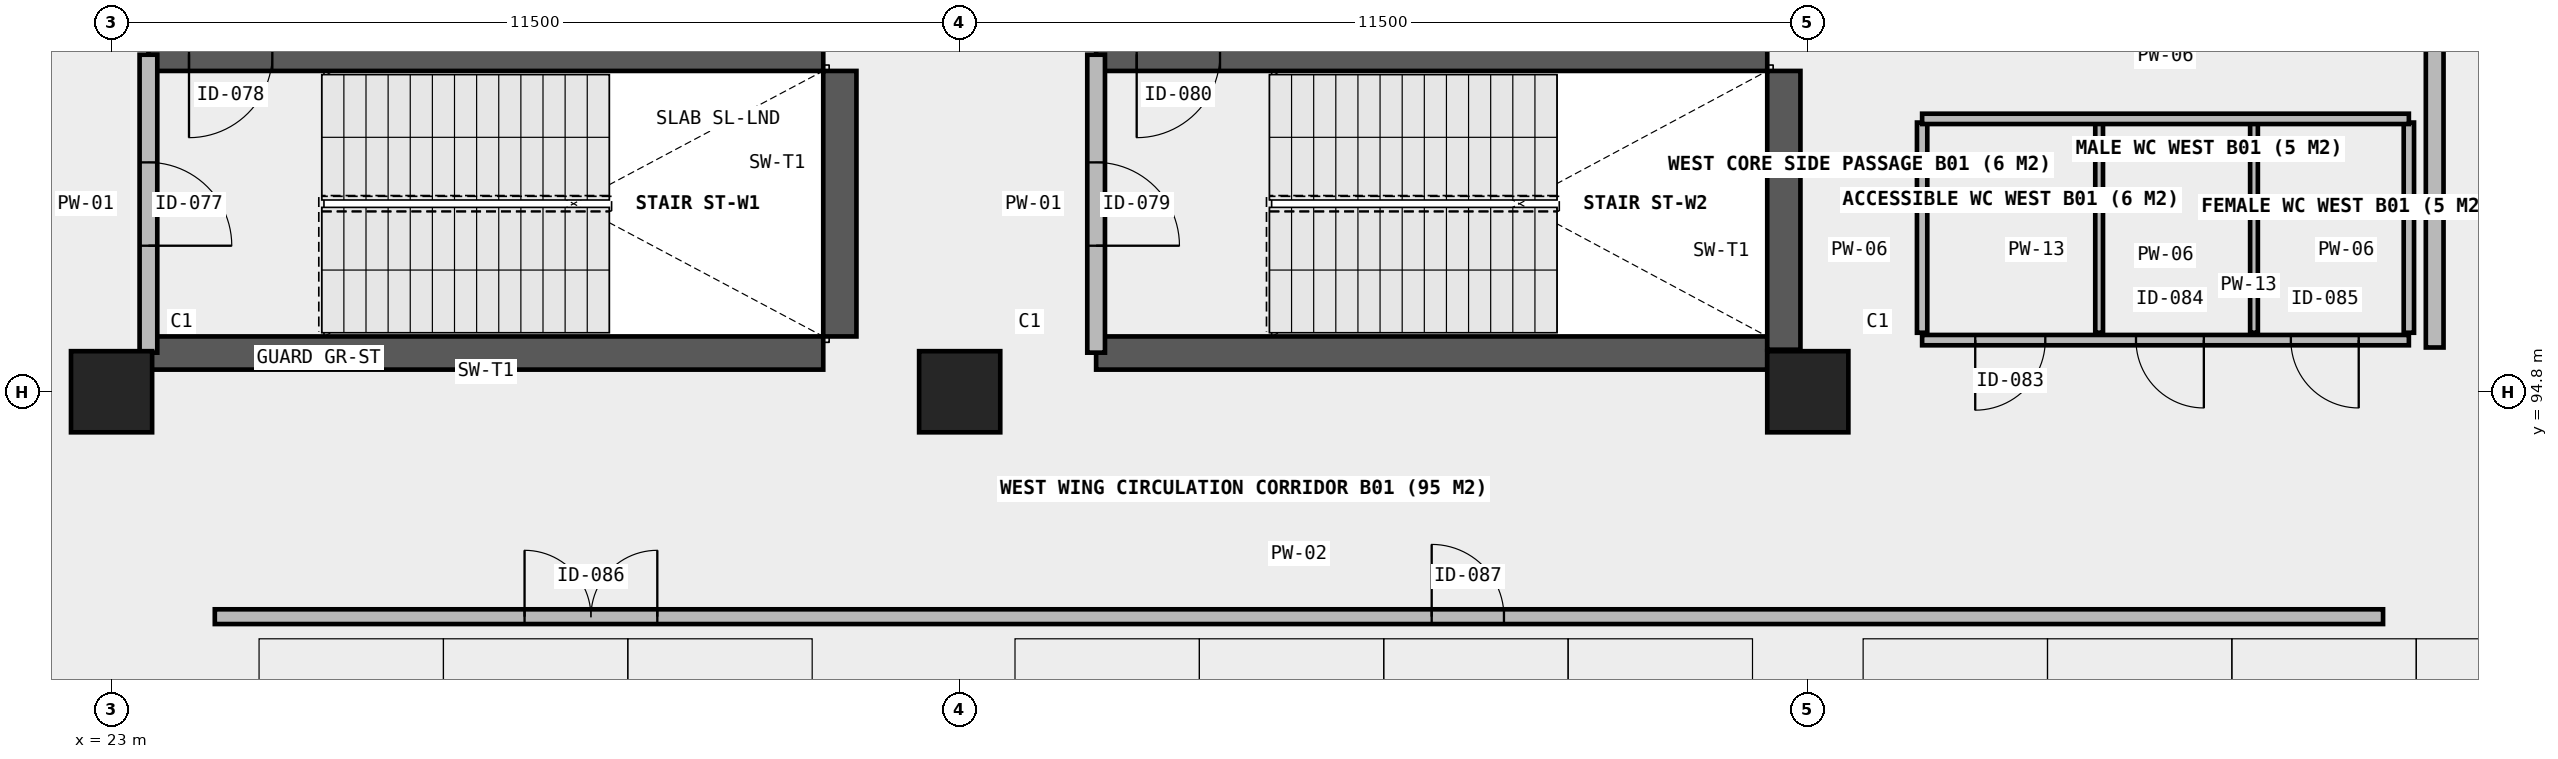
"""IFC4 building model, lengths in metres.
Left out: names, types, materials, properties, quantities, classifications, styles, units other than length and angle.
Written with IfcOpenShell. Run it as: python <this file> out.ifc"""

import sys

from ifc_helpers import new_model, si_unit, direction, frame, frame_2d, origin, origin_2d, place, context, subcontext, project, spatial, rectangle, extrude, element, fill, save


model = new_model("IFC4")
c1 = context("Model", 3, precision=1e-05, world=origin(), true_north=direction((0.0, 1.0)))
c2 = subcontext(c1, "Body", "Model", "MODEL_VIEW")
j1 = project(units=[si_unit("LENGTHUNIT", "METRE"), si_unit("PLANEANGLEUNIT", "RADIAN")], contexts=[c1])
p1 = place(None, origin())
s1 = spatial("IfcSite", under=j1, at=p1, CompositionType="ELEMENT")
p2 = place(p1, origin())
s2 = spatial("IfcBuilding", under=s1, at=p2, CompositionType="ELEMENT")
p3 = place(p2, frame((0.0, 0.0, -4.2)))
s3 = spatial("IfcBuildingStorey", under=s2, at=p3, CompositionType="ELEMENT", Elevation=-4.2)
for number, where, z_axis, x_axis in (
    (1, (23.0, 94.8, 0.0), (0.0, 0.0, 1.0), (1.0, 0.0, 0.0)),
    (2, (34.5, 94.8, 0.0), (0.0, 0.0, 1.0), (1.0, 0.0, 0.0)),
    (3, (46.0, 94.8, 0.0), (0.0, 0.0, 1.0), (1.0, 0.0, 0.0)),
):
    element("IfcColumn", number, at=place(p3, frame(where, z_axis=z_axis, x_axis=x_axis)), inside=s3, PredefinedType="COLUMN", context=c2, shape_type="SweptSolid", body=[
        extrude(rectangle(XDim=1.1, YDim=1.1, at=origin_2d()), origin(), (0.0, 0.0, 1.0), 4.2),
    ])
p4 = place(p3, frame((23.5, 95.325, 0.0), z_axis=(0.0, 0.0, 1.0), x_axis=(1.0, 0.0, 0.0)))
e4 = element("IfcWall", 4, at=p4, inside=s3, PredefinedType="SHEAR", context=c2, shape_type="SweptSolid", body=[
    extrude(rectangle(XDim=9.15, YDim=0.45, at=frame_2d((4.575, 0.0))), origin(), (0.0, 0.0, 1.0), 4.2),
])
p5 = place(p3, frame((23.5, 99.375, 0.0), z_axis=(0.0, 0.0, 1.0), x_axis=(1.0, 0.0, 0.0)))
e5 = element("IfcWall", 5, at=p5, inside=s3, PredefinedType="SHEAR", context=c2, shape_type="SweptSolid", body=[
    extrude(rectangle(XDim=9.15, YDim=0.45, at=frame_2d((4.575, 0.0))), origin(), (0.0, 0.0, 1.0), 4.2),
])
p6 = place(p5, frame((0.55, 0.0, 0.0)))
e6 = element("IfcOpeningElement", 6, at=p6, cuts=e5, PredefinedType="OPENING", context=c2, shape_type="SweptSolid", body=[
    extrude(rectangle(XDim=1.13, YDim=2.15, at=frame_2d((0.565, 1.075))), frame((0.0, 0.235, 0.0), z_axis=(0.0, -1.0, 0.0), x_axis=(1.0, 0.0, 0.0)), (0.0, 0.0, 1.0), 0.47),
])
p7 = place(p3, frame((32.875, 95.55, 0.0), z_axis=(0.0, 0.0, 1.0), x_axis=(0.0, 1.0, 0.0)))
e7 = element("IfcWall", 7, at=p7, inside=s3, PredefinedType="SHEAR", context=c2, shape_type="SweptSolid", body=[
    extrude(rectangle(XDim=3.6, YDim=0.45, at=frame_2d((1.8, 0.0))), origin(), (0.0, 0.0, 1.0), 4.2),
])
p8 = place(p3, frame((36.35, 95.325, 0.0), z_axis=(0.0, 0.0, 1.0), x_axis=(1.0, 0.0, 0.0)))
e8 = element("IfcWall", 8, at=p8, inside=s3, PredefinedType="SHEAR", context=c2, shape_type="SweptSolid", body=[
    extrude(rectangle(XDim=9.1, YDim=0.45, at=frame_2d((4.55, 0.0))), origin(), (0.0, 0.0, 1.0), 4.2),
])
p9 = place(p3, frame((36.35, 99.375, 0.0), z_axis=(0.0, 0.0, 1.0), x_axis=(1.0, 0.0, 0.0)))
e9 = element("IfcWall", 9, at=p9, inside=s3, PredefinedType="SHEAR", context=c2, shape_type="SweptSolid", body=[
    extrude(rectangle(XDim=9.1, YDim=0.45, at=frame_2d((4.55, 0.0))), origin(), (0.0, 0.0, 1.0), 4.2),
])
p10 = place(p9, frame((0.55, 0.0, 0.0)))
e10 = element("IfcOpeningElement", 10, at=p10, cuts=e9, PredefinedType="OPENING", context=c2, shape_type="SweptSolid", body=[
    extrude(rectangle(XDim=1.13, YDim=2.15, at=frame_2d((0.565, 1.075))), frame((0.0, 0.235, 0.0), z_axis=(0.0, -1.0, 0.0), x_axis=(1.0, 0.0, 0.0)), (0.0, 0.0, 1.0), 0.47),
])
p11 = place(p3, frame((45.675, 95.37, 0.0), z_axis=(0.0, 0.0, 1.0), x_axis=(0.0, 1.0, 0.0)))
e11 = element("IfcWall", 11, at=p11, inside=s3, PredefinedType="SHEAR", context=c2, shape_type="SweptSolid", body=[
    extrude(rectangle(XDim=3.78, YDim=0.45, at=frame_2d((1.89, 0.0))), origin(), (0.0, 0.0, 1.0), 4.2),
])
p12 = place(p3, frame((23.5, 95.33, 0.0), z_axis=(0.0, 0.0, 1.0), x_axis=(0.0, 1.0, 0.0)))
e12 = element("IfcWall", 12, at=p12, inside=s3, PredefinedType="SOLIDWALL", context=c2, shape_type="SweptSolid", body=[
    extrude(rectangle(XDim=4.04, YDim=0.24, at=frame_2d((2.02, 0.0))), origin(), (0.0, 0.0, 1.0), 3.86),
])
p13 = place(p12, frame((1.45, 0.0, 0.0)))
e13 = element("IfcOpeningElement", 13, at=p13, cuts=e12, PredefinedType="OPENING", context=c2, shape_type="SweptSolid", body=[
    extrude(rectangle(XDim=1.13, YDim=2.15, at=frame_2d((0.565, 1.075))), frame((0.0, 0.13, 0.0), z_axis=(0.0, -1.0, 0.0), x_axis=(1.0, 0.0, 0.0)), (0.0, 0.0, 1.0), 0.26),
])
p14 = place(p3, frame((36.35, 95.33, 0.0), z_axis=(0.0, 0.0, 1.0), x_axis=(0.0, 1.0, 0.0)))
e14 = element("IfcWall", 14, at=p14, inside=s3, PredefinedType="SOLIDWALL", context=c2, shape_type="SweptSolid", body=[
    extrude(rectangle(XDim=4.04, YDim=0.24, at=frame_2d((2.02, 0.0))), origin(), (0.0, 0.0, 1.0), 3.86),
])
p15 = place(p14, frame((1.45, 0.0, 0.0)))
e15 = element("IfcOpeningElement", 15, at=p15, cuts=e14, PredefinedType="OPENING", context=c2, shape_type="SweptSolid", body=[
    extrude(rectangle(XDim=1.13, YDim=2.15, at=frame_2d((0.565, 1.075))), frame((0.0, 0.13, 0.0), z_axis=(0.0, -1.0, 0.0), x_axis=(1.0, 0.0, 0.0)), (0.0, 0.0, 1.0), 0.26),
])
p16 = place(p3, frame((47.55, 95.5, 0.0), z_axis=(0.0, 0.0, 1.0), x_axis=(1.0, 0.0, 0.0)))
e16 = element("IfcWall", 16, at=p16, inside=s3, PredefinedType="PLUMBINGWALL", context=c2, shape_type="SweptSolid", body=[
    extrude(rectangle(XDim=6.6, YDim=0.14, at=frame_2d((3.3, 0.0))), origin(), (0.0, 0.0, 1.0), 3.86),
])
p17 = place(p16, frame((0.72, 0.0, 0.0)))
e17 = element("IfcOpeningElement", 17, at=p17, cuts=e16, PredefinedType="OPENING", context=c2, shape_type="SweptSolid", body=[
    extrude(rectangle(XDim=0.95, YDim=2.1, at=frame_2d((0.475, 1.05))), frame((0.0, 0.08, 0.0), z_axis=(0.0, -1.0, 0.0), x_axis=(1.0, 0.0, 0.0)), (0.0, 0.0, 1.0), 0.16),
])
p18 = place(p16, frame((2.9, 0.0, 0.0)))
e18 = element("IfcOpeningElement", 18, at=p18, cuts=e16, PredefinedType="OPENING", context=c2, shape_type="SweptSolid", body=[
    extrude(rectangle(XDim=0.92, YDim=2.1, at=frame_2d((0.46, 1.05))), frame((0.0, 0.08, 0.0), z_axis=(0.0, -1.0, 0.0), x_axis=(1.0, 0.0, 0.0)), (0.0, 0.0, 1.0), 0.16),
])
p19 = place(p16, frame((5.0, 0.0, 0.0)))
e19 = element("IfcOpeningElement", 19, at=p19, cuts=e16, PredefinedType="OPENING", context=c2, shape_type="SweptSolid", body=[
    extrude(rectangle(XDim=0.92, YDim=2.1, at=frame_2d((0.46, 1.05))), frame((0.0, 0.08, 0.0), z_axis=(0.0, -1.0, 0.0), x_axis=(1.0, 0.0, 0.0)), (0.0, 0.0, 1.0), 0.16),
])
p20 = place(p3, frame((47.55, 95.6, 0.0), z_axis=(0.0, 0.0, 1.0), x_axis=(0.0, 1.0, 0.0)))
e20 = element("IfcWall", 20, at=p20, inside=s3, PredefinedType="PLUMBINGWALL", context=c2, shape_type="SweptSolid", body=[
    extrude(rectangle(XDim=2.85, YDim=0.14, at=frame_2d((1.425, 0.0))), origin(), (0.0, 0.0, 1.0), 3.86),
])
p21 = place(p3, frame((49.95, 95.6, 0.0), z_axis=(0.0, 0.0, 1.0), x_axis=(0.0, 1.0, 0.0)))
e21 = element("IfcWall", 21, at=p21, inside=s3, PredefinedType="PARTITIONING", context=c2, shape_type="SweptSolid", body=[
    extrude(rectangle(XDim=2.85, YDim=0.105, at=frame_2d((1.425, 0.0))), origin(), (0.0, 0.0, 1.0), 3.33),
])
p22 = place(p3, frame((52.05, 95.6, 0.0), z_axis=(0.0, 0.0, 1.0), x_axis=(0.0, 1.0, 0.0)))
e22 = element("IfcWall", 22, at=p22, inside=s3, PredefinedType="PARTITIONING", context=c2, shape_type="SweptSolid", body=[
    extrude(rectangle(XDim=2.85, YDim=0.105, at=frame_2d((1.425, 0.0))), origin(), (0.0, 0.0, 1.0), 3.86),
])
p23 = place(p3, frame((54.15, 95.6, 0.0), z_axis=(0.0, 0.0, 1.0), x_axis=(0.0, 1.0, 0.0)))
e23 = element("IfcWall", 23, at=p23, inside=s3, PredefinedType="PLUMBINGWALL", context=c2, shape_type="SweptSolid", body=[
    extrude(rectangle(XDim=2.85, YDim=0.14, at=frame_2d((1.425, 0.0))), origin(), (0.0, 0.0, 1.0), 3.86),
])
p24 = place(p3, frame((47.55, 98.5, 0.0), z_axis=(0.0, 0.0, 1.0), x_axis=(1.0, 0.0, 0.0)))
e24 = element("IfcWall", 24, at=p24, inside=s3, PredefinedType="PLUMBINGWALL", context=c2, shape_type="SweptSolid", body=[
    extrude(rectangle(XDim=6.6, YDim=0.14, at=frame_2d((3.3, 0.0))), origin(), (0.0, 0.0, 1.0), 3.86),
])
p25 = place(p3, frame((24.4, 91.75, 0.0), z_axis=(0.0, 0.0, 1.0), x_axis=(1.0, 0.0, 0.0)))
e25 = element("IfcWall", 25, at=p25, inside=s3, PredefinedType="PARTITIONING", context=c2, shape_type="SweptSolid", body=[
    extrude(rectangle(XDim=29.4, YDim=0.2, at=frame_2d((14.7, 0.0))), origin(), (0.0, 0.0, 1.0), 3.86),
])
p26 = place(p25, frame((4.2, 0.0, 0.0)))
e26 = element("IfcOpeningElement", 26, at=p26, cuts=e25, PredefinedType="OPENING", context=c2, shape_type="SweptSolid", body=[
    extrude(rectangle(XDim=1.8, YDim=2.2, at=frame_2d((0.9, 1.1))), frame((0.0, 0.11, 0.0), z_axis=(0.0, -1.0, 0.0), x_axis=(1.0, 0.0, 0.0)), (0.0, 0.0, 1.0), 0.22),
])
p27 = place(p25, frame((16.5, 0.0, 0.0)))
e27 = element("IfcOpeningElement", 27, at=p27, cuts=e25, PredefinedType="OPENING", context=c2, shape_type="SweptSolid", body=[
    extrude(rectangle(XDim=0.98, YDim=2.15, at=frame_2d((0.49, 1.075))), frame((0.0, 0.11, 0.0), z_axis=(0.0, -1.0, 0.0), x_axis=(1.0, 0.0, 0.0)), (0.0, 0.0, 1.0), 0.22),
])
p28 = place(p3, frame((54.5, 95.4, 0.0), z_axis=(0.0, 0.0, 1.0), x_axis=(0.0, 1.0, 0.0)))
e28 = element("IfcWall", 28, at=p28, inside=s3, PredefinedType="SOLIDWALL", context=c2, shape_type="SweptSolid", body=[
    extrude(rectangle(XDim=18.8, YDim=0.24, at=frame_2d((9.4, 0.0))), origin(), (0.0, 0.0, 1.0), 3.86),
])
p29 = place(p28, frame((4.2, 0.0, 0.0)))
e29 = element("IfcOpeningElement", 29, at=p29, cuts=e28, PredefinedType="OPENING", context=c2, shape_type="SweptSolid", body=[
    extrude(rectangle(XDim=0.96, YDim=2.1, at=frame_2d((0.48, 1.05))), frame((0.0, 0.13, 0.0), z_axis=(0.0, -1.0, 0.0), x_axis=(1.0, 0.0, 0.0)), (0.0, 0.0, 1.0), 0.26),
])
p30 = place(p13, frame((0.565, 0.0, 0.0), z_axis=(0.0, 0.0, 1.0), x_axis=(-1.0, 0.0, 0.0)))
e30 = element("IfcDoor", 30, at=p30, inside=s3, OperationType="SINGLE_SWING_LEFT", PredefinedType="DOOR", context=c2, shape_type="SweptSolid", body=[
    extrude(rectangle(XDim=1.13, YDim=2.15, at=frame_2d((0.0, 1.075))), frame((0.0, 0.025, 0.0), z_axis=(0.0, -1.0, 0.0), x_axis=(1.0, 0.0, 0.0)), (0.0, 0.0, 1.0), 0.05),
])
fill(e13, e30)
p31 = place(p6, frame((0.565, 0.0, 0.0), z_axis=(0.0, 0.0, 1.0), x_axis=(-1.0, 0.0, 0.0)))
e31 = element("IfcDoor", 31, at=p31, inside=s3, OperationType="SINGLE_SWING_LEFT", PredefinedType="DOOR", context=c2, shape_type="SweptSolid", body=[
    extrude(rectangle(XDim=1.13, YDim=2.15, at=frame_2d((0.0, 1.075))), frame((0.0, 0.025, 0.0), z_axis=(0.0, -1.0, 0.0), x_axis=(1.0, 0.0, 0.0)), (0.0, 0.0, 1.0), 0.05),
])
fill(e6, e31)
p32 = place(p15, frame((0.565, 0.0, 0.0), z_axis=(0.0, 0.0, 1.0), x_axis=(-1.0, 0.0, 0.0)))
e32 = element("IfcDoor", 32, at=p32, inside=s3, OperationType="SINGLE_SWING_LEFT", PredefinedType="DOOR", context=c2, shape_type="SweptSolid", body=[
    extrude(rectangle(XDim=1.13, YDim=2.15, at=frame_2d((0.0, 1.075))), frame((0.0, 0.025, 0.0), z_axis=(0.0, -1.0, 0.0), x_axis=(1.0, 0.0, 0.0)), (0.0, 0.0, 1.0), 0.05),
])
fill(e15, e32)
p33 = place(p10, frame((0.565, 0.0, 0.0), z_axis=(0.0, 0.0, 1.0), x_axis=(-1.0, 0.0, 0.0)))
e33 = element("IfcDoor", 33, at=p33, inside=s3, OperationType="SINGLE_SWING_LEFT", PredefinedType="DOOR", context=c2, shape_type="SweptSolid", body=[
    extrude(rectangle(XDim=1.13, YDim=2.15, at=frame_2d((0.0, 1.075))), frame((0.0, 0.025, 0.0), z_axis=(0.0, -1.0, 0.0), x_axis=(1.0, 0.0, 0.0)), (0.0, 0.0, 1.0), 0.05),
])
fill(e10, e33)
p34 = place(p17, frame((0.475, 0.0, 0.0), z_axis=(0.0, 0.0, 1.0), x_axis=(-1.0, 0.0, 0.0)))
e34 = element("IfcDoor", 34, at=p34, inside=s3, OperationType="SINGLE_SWING_LEFT", PredefinedType="DOOR", context=c2, shape_type="SweptSolid", body=[
    extrude(rectangle(XDim=0.95, YDim=2.1, at=frame_2d((0.0, 1.05))), frame((0.0, 0.025, 0.0), z_axis=(0.0, -1.0, 0.0), x_axis=(1.0, 0.0, 0.0)), (0.0, 0.0, 1.0), 0.05),
])
fill(e17, e34)
p35 = place(p18, origin())
e35 = element("IfcDoor", 35, at=p35, inside=s3, OperationType="SINGLE_SWING_RIGHT", PredefinedType="DOOR", context=c2, shape_type="SweptSolid", body=[
    extrude(rectangle(XDim=0.92, YDim=2.1, at=frame_2d((0.46, 1.05))), frame((0.0, 0.025, 0.0), z_axis=(0.0, -1.0, 0.0), x_axis=(1.0, 0.0, 0.0)), (0.0, 0.0, 1.0), 0.05),
])
fill(e18, e35)
p36 = place(p19, origin())
e36 = element("IfcDoor", 36, at=p36, inside=s3, OperationType="SINGLE_SWING_RIGHT", PredefinedType="DOOR", context=c2, shape_type="SweptSolid", body=[
    extrude(rectangle(XDim=0.92, YDim=2.1, at=frame_2d((0.46, 1.05))), frame((0.0, 0.025, 0.0), z_axis=(0.0, -1.0, 0.0), x_axis=(1.0, 0.0, 0.0)), (0.0, 0.0, 1.0), 0.05),
])
fill(e19, e36)
p37 = place(p26, origin())
e37 = element("IfcDoor", 37, at=p37, inside=s3, OperationType="DOUBLE_DOOR_SINGLE_SWING", PredefinedType="DOOR", context=c2, shape_type="SweptSolid", body=[
    extrude(rectangle(XDim=1.8, YDim=2.2, at=frame_2d((0.9, 1.1))), frame((0.0, 0.025, 0.0), z_axis=(0.0, -1.0, 0.0), x_axis=(1.0, 0.0, 0.0)), (0.0, 0.0, 1.0), 0.05),
])
fill(e26, e37)
p38 = place(p27, origin())
e38 = element("IfcDoor", 38, at=p38, inside=s3, OperationType="SINGLE_SWING_LEFT", PredefinedType="DOOR", context=c2, shape_type="SweptSolid", body=[
    extrude(rectangle(XDim=0.98, YDim=2.15, at=frame_2d((0.49, 1.075))), frame((0.0, 0.025, 0.0), z_axis=(0.0, -1.0, 0.0), x_axis=(1.0, 0.0, 0.0)), (0.0, 0.0, 1.0), 0.05),
])
fill(e27, e38)
save(model, sys.argv[1])
